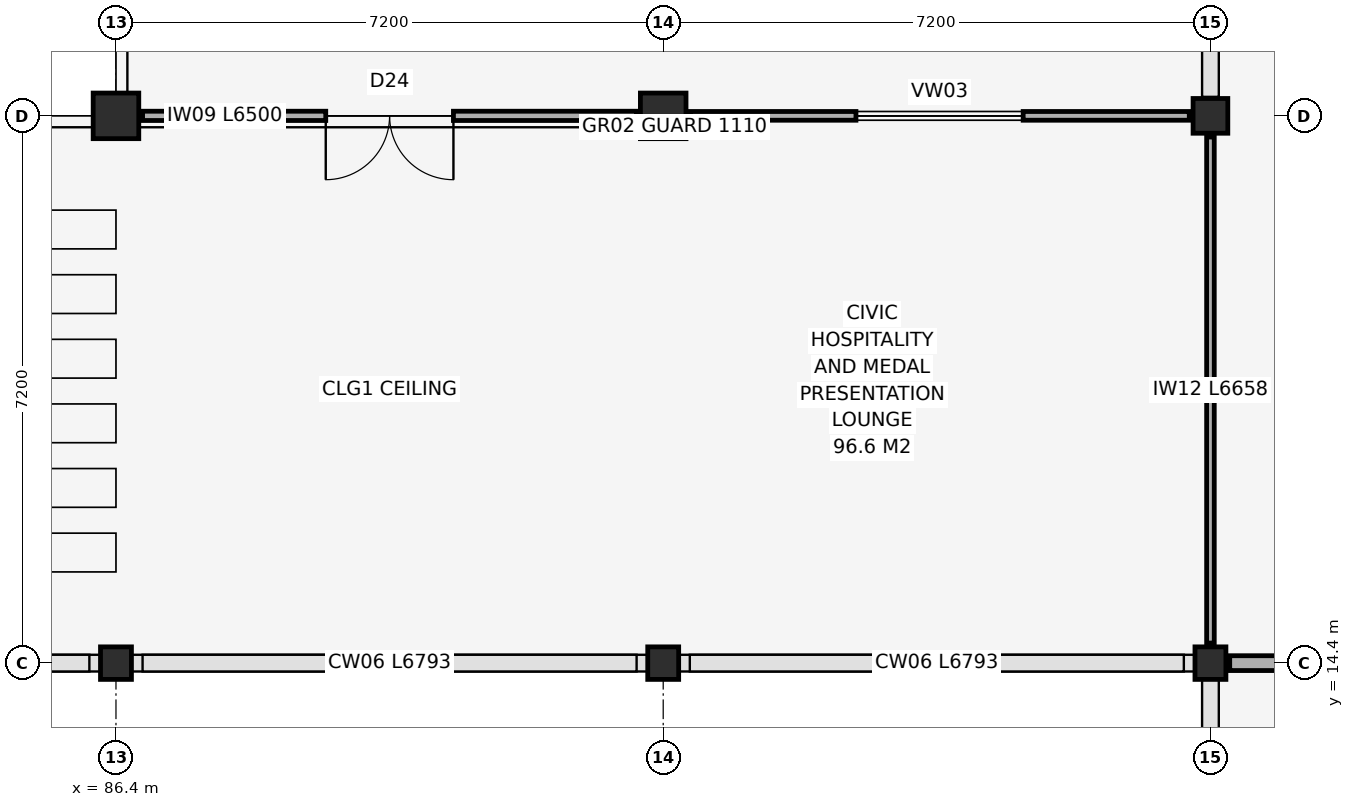
"""IFC4 building model, lengths in metres.
Left out: names, types, materials, properties, quantities, classifications, styles, units other than length and angle.
Written with IfcOpenShell. Run it as: python <this file> out.ifc"""

import sys

from ifc_helpers import new_model, si_unit, direction, frame, frame_2d, origin, origin_2d, place, context, subcontext, project, spatial, rectangle, hollow_circle, i_section, extrude, element, fill, save


model = new_model("IFC4")
c1 = context("Model", 3, precision=1e-05, world=origin(), true_north=direction((0.0, 1.0)))
c2 = subcontext(c1, "Body", "Model", "MODEL_VIEW")
j1 = project(units=[si_unit("LENGTHUNIT", "METRE"), si_unit("PLANEANGLEUNIT", "RADIAN")], contexts=[c1])
p1 = place(None, origin())
s1 = spatial("IfcSite", under=j1, at=p1, CompositionType="ELEMENT")
p2 = place(p1, origin())
s2 = spatial("IfcBuilding", under=s1, at=p2, CompositionType="ELEMENT")
p3 = place(p2, frame((0.0, 0.0, 10.2)))
s3 = spatial("IfcBuildingStorey", under=s2, at=p3, CompositionType="ELEMENT", Elevation=10.2)
p4 = place(p3, frame((86.4, 14.4, 0.0), z_axis=(0.0, 0.0, 1.0), x_axis=(1.0, 0.0, 0.0)))
e1 = element("IfcColumn", 1, at=p4, inside=s3, PredefinedType="COLUMN", context=c2, shape_type="SweptSolid", body=[
    extrude(i_section(OverallWidth=0.407, OverallDepth=0.428, WebThickness=0.02, FlangeThickness=0.035, FilletRadius=0.022, at=origin_2d()), origin(), (0.0, 0.0, 1.0), 4.8),
])
p5 = place(p3, frame((86.4, 21.6, 0.0), z_axis=(0.0, 0.0, 1.0), x_axis=(1.0, 0.0, 0.0)))
e2 = element("IfcColumn", 2, at=p5, inside=s3, PredefinedType="COLUMN", context=c2, shape_type="SweptSolid", body=[
    extrude(rectangle(XDim=0.6, YDim=0.6, at=origin_2d()), origin(), (0.0, 0.0, 1.0), 4.8),
])
p6 = place(p3, frame((93.6, 14.4, 0.0), z_axis=(0.0, 0.0, 1.0), x_axis=(1.0, 0.0, 0.0)))
e3 = element("IfcColumn", 3, at=p6, inside=s3, PredefinedType="COLUMN", context=c2, shape_type="SweptSolid", body=[
    extrude(i_section(OverallWidth=0.407, OverallDepth=0.428, WebThickness=0.02, FlangeThickness=0.035, FilletRadius=0.022, at=origin_2d()), origin(), (0.0, 0.0, 1.0), 11.825),
])
p7 = place(p3, frame((93.6, 21.6, 0.0), z_axis=(0.0, 0.0, 1.0), x_axis=(1.0, 0.0, 0.0)))
e4 = element("IfcColumn", 4, at=p7, inside=s3, PredefinedType="COLUMN", context=c2, shape_type="SweptSolid", body=[
    extrude(rectangle(XDim=0.6, YDim=0.6, at=origin_2d()), origin(), (0.0, 0.0, 1.0), 4.8),
])
p8 = place(p3, frame((100.8, 14.4, 0.0), z_axis=(0.0, 0.0, 1.0), x_axis=(1.0, 0.0, 0.0)))
e5 = element("IfcColumn", 5, at=p8, inside=s3, PredefinedType="COLUMN", context=c2, shape_type="SweptSolid", body=[
    extrude(i_section(OverallWidth=0.407, OverallDepth=0.428, WebThickness=0.02, FlangeThickness=0.035, FilletRadius=0.022, at=origin_2d()), origin(), (0.0, 0.0, 1.0), 4.8),
])
p9 = place(p3, frame((100.8, 21.6, 0.0), z_axis=(0.0, 0.0, 1.0), x_axis=(1.0, 0.0, 0.0)))
e6 = element("IfcColumn", 6, at=p9, inside=s3, PredefinedType="COLUMN", context=c2, shape_type="SweptSolid", body=[
    extrude(hollow_circle(Radius=0.229, WallThickness=0.02, at=origin_2d()), origin(), (0.0, 0.0, 1.0), 6.0),
])
p10 = place(p3, frame((86.75, 21.6, 0.0), z_axis=(0.0, 0.0, 1.0), x_axis=(1.0, 0.0, 0.0)))
e7 = element("IfcWall", 7, at=p10, inside=s3, PredefinedType="PARTITIONING", context=c2, shape_type="SweptSolid", body=[
    extrude(rectangle(XDim=6.5, YDim=0.122, at=frame_2d((3.25, 0.0))), origin(), (0.0, 0.0, 1.0), 4.56),
])
p11 = place(p10, frame((2.41, 0.0, 0.0)))
e8 = element("IfcOpeningElement", 8, at=p11, cuts=e7, PredefinedType="OPENING", context=c2, shape_type="SweptSolid", body=[
    extrude(rectangle(XDim=1.68, YDim=2.25, at=frame_2d((0.84, 1.125))), frame((0.0, 0.076, 0.0), z_axis=(0.0, -1.0, 0.0), x_axis=(1.0, 0.0, 0.0)), (0.0, 0.0, 1.0), 0.152),
])
p12 = place(p3, frame((93.95, 21.6, 0.0), z_axis=(0.0, 0.0, 1.0), x_axis=(1.0, 0.0, 0.0)))
e9 = element("IfcWall", 9, at=p12, inside=s3, PredefinedType="PARTITIONING", context=c2, shape_type="SweptSolid", body=[
    extrude(rectangle(XDim=6.572, YDim=0.115, at=frame_2d((3.286, 0.0))), origin(), (0.0, 0.0, 1.0), 4.56),
])
p13 = place(p12, frame((2.186, 0.0, 0.95)))
e10 = element("IfcOpeningElement", 10, at=p13, cuts=e9, PredefinedType="OPENING", context=c2, shape_type="SweptSolid", body=[
    extrude(rectangle(XDim=2.2, YDim=1.5, at=frame_2d((1.1, 0.75))), frame((0.0, 0.072, 0.0), z_axis=(0.0, -1.0, 0.0), x_axis=(1.0, 0.0, 0.0)), (0.0, 0.0, 1.0), 0.145),
])
p14 = place(p3, frame((100.8, 14.664, 0.0), z_axis=(0.0, 0.0, 1.0), x_axis=(0.0, 1.0, 0.0)))
e11 = element("IfcWall", 11, at=p14, inside=s3, PredefinedType="PARTITIONING", context=c2, shape_type="SweptSolid", body=[
    extrude(rectangle(XDim=6.657, YDim=0.1, at=frame_2d((3.329, 0.0))), origin(), (0.0, 0.0, 1.0), 4.56),
])
p15 = place(p3, frame((101.053, 14.4, 0.0), z_axis=(0.0, 0.0, 1.0), x_axis=(1.0, 0.0, 0.0)))
e12 = element("IfcWall", 12, at=p15, inside=s3, PredefinedType="PARTITIONING", context=c2, shape_type="SweptSolid", body=[
    extrude(rectangle(XDim=13.747, YDim=0.195, at=frame_2d((6.873, 0.0))), origin(), (0.0, 0.0, 1.0), 4.56),
])
p16 = place(p15, frame((2.767, 0.0, 0.0)))
e13 = element("IfcOpeningElement", 13, at=p16, cuts=e12, PredefinedType="OPENING", context=c2, shape_type="SweptSolid", body=[
    extrude(rectangle(XDim=1.16, YDim=2.2, at=frame_2d((0.58, 1.1))), frame((0.0, 0.112, 0.0), z_axis=(0.0, -1.0, 0.0), x_axis=(1.0, 0.0, 0.0)), (0.0, 0.0, 1.0), 0.225),
])
p17 = place(p11, frame((1.68, 0.0, 0.0), z_axis=(0.0, 0.0, 1.0), x_axis=(-1.0, 0.0, 0.0)))
e14 = element("IfcDoor", 14, at=p17, inside=s3, OperationType="DOUBLE_SWING_LEFT", PredefinedType="DOOR", context=c2, shape_type="SweptSolid", body=[
    extrude(rectangle(XDim=1.68, YDim=2.25, at=frame_2d((0.84, 1.125))), frame((0.0, 0.025, 0.0), z_axis=(0.0, -1.0, 0.0), x_axis=(1.0, 0.0, 0.0)), (0.0, 0.0, 1.0), 0.05),
])
fill(e8, e14)
p18 = place(p13, origin())
e15 = element("IfcWindow", 15, at=p18, inside=s3, PartitioningType="SINGLE_PANEL", PredefinedType="WINDOW", context=c2, shape_type="SweptSolid", body=[
    extrude(rectangle(XDim=2.2, YDim=1.5, at=frame_2d((1.1, 0.75))), frame((0.0, 0.03, 0.0), z_axis=(0.0, -1.0, 0.0), x_axis=(1.0, 0.0, 0.0)), (0.0, 0.0, 1.0), 0.06),
])
fill(e10, e15)
save(model, sys.argv[1])
